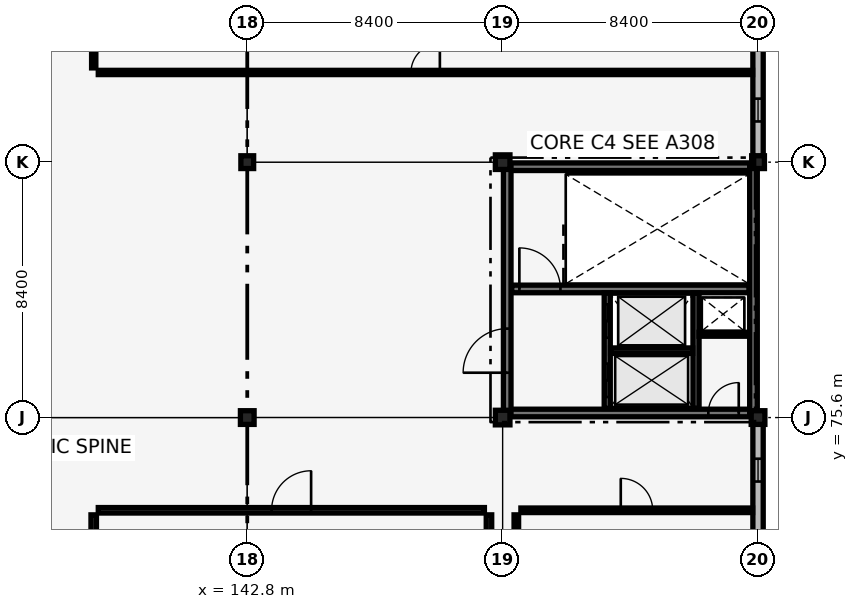
"""IFC4 building model, lengths in metres.
Left out: names, types, materials, properties, quantities, classifications, styles, units other than length and angle.
Written with IfcOpenShell. Run it as: python <this file> out.ifc"""

import sys

from ifc_helpers import new_model, si_unit, direction, frame, frame_2d, origin, origin_2d, place, context, subcontext, project, spatial, rectangle, extrude, element, fill, save


model = new_model("IFC4")
c1 = context("Model", 3, precision=1e-05, world=origin(), true_north=direction((0.0, 1.0)))
c2 = subcontext(c1, "Body", "Model", "MODEL_VIEW")
j1 = project(units=[si_unit("LENGTHUNIT", "METRE"), si_unit("PLANEANGLEUNIT", "RADIAN")], contexts=[c1])
p1 = place(None, origin())
s1 = spatial("IfcSite", under=j1, at=p1, CompositionType="ELEMENT")
p2 = place(p1, origin())
s2 = spatial("IfcBuilding", under=s1, at=p2, CompositionType="ELEMENT")
p3 = place(p2, frame((0.0, 0.0, 26.18)))
s3 = spatial("IfcBuildingStorey", under=s2, at=p3, CompositionType="ELEMENT", Elevation=26.18)
p4 = place(p3, frame((151.35, 75.75, 0.0), z_axis=(0.0, 0.0, 1.0), x_axis=(1.0, 0.0, 0.0)))
e1 = element("IfcWall", 1, at=p4, inside=s3, PredefinedType="SHEAR", context=c2, shape_type="SweptSolid", body=[
    extrude(rectangle(XDim=8.1, YDim=0.25, at=frame_2d((4.05, 0.0))), origin(), (0.0, 0.0, 1.0), 3.84),
])
p5 = place(p4, frame((6.615, 0.0, 0.0)))
e2 = element("IfcOpeningElement", 2, at=p5, cuts=e1, PredefinedType="OPENING", context=c2, shape_type="SweptSolid", body=[
    extrude(rectangle(XDim=1.0, YDim=2.15, at=frame_2d((0.5, 1.075))), frame((0.0, 0.135, 0.0), z_axis=(0.0, -1.0, 0.0), x_axis=(1.0, 0.0, 0.0)), (0.0, 0.0, 1.0), 0.27),
])
p6 = place(p3, frame((151.35, 83.85, 0.0), z_axis=(0.0, 0.0, 1.0), x_axis=(1.0, 0.0, 0.0)))
e3 = element("IfcWall", 3, at=p6, inside=s3, PredefinedType="SHEAR", context=c2, shape_type="SweptSolid", body=[
    extrude(rectangle(XDim=8.1, YDim=0.25, at=frame_2d((4.05, 0.0))), origin(), (0.0, 0.0, 1.0), 3.84),
])
p7 = place(p3, frame((151.35, 75.75, 0.0), z_axis=(0.0, 0.0, 1.0), x_axis=(0.0, 1.0, 0.0)))
e4 = element("IfcWall", 4, at=p7, inside=s3, PredefinedType="SHEAR", context=c2, shape_type="SweptSolid", body=[
    extrude(rectangle(XDim=8.1, YDim=0.25, at=frame_2d((4.05, 0.0))), origin(), (0.0, 0.0, 1.0), 3.84),
])
p8 = place(p7, frame((1.325, 0.0, 0.0)))
e5 = element("IfcOpeningElement", 5, at=p8, cuts=e4, PredefinedType="OPENING", context=c2, shape_type="SweptSolid", body=[
    extrude(rectangle(XDim=1.45, YDim=2.15, at=frame_2d((0.725, 1.075))), frame((0.0, 0.135, 0.0), z_axis=(0.0, -1.0, 0.0), x_axis=(1.0, 0.0, 0.0)), (0.0, 0.0, 1.0), 0.27),
])
p9 = place(p3, frame((159.45, 75.75, 0.0), z_axis=(0.0, 0.0, 1.0), x_axis=(0.0, 1.0, 0.0)))
e6 = element("IfcWall", 6, at=p9, inside=s3, PredefinedType="SHEAR", context=c2, shape_type="SweptSolid", body=[
    extrude(rectangle(XDim=8.1, YDim=0.25, at=frame_2d((4.05, 0.0))), origin(), (0.0, 0.0, 1.0), 3.84),
])
p10 = place(p3, frame((151.5, 79.83, 0.0), z_axis=(0.0, 0.0, 1.0), x_axis=(1.0, 0.0, 0.0)))
e7 = element("IfcWall", 7, at=p10, inside=s3, PredefinedType="SHEAR", context=c2, shape_type="SweptSolid", body=[
    extrude(rectangle(XDim=7.8, YDim=0.25, at=frame_2d((3.9, 0.0))), origin(), (0.0, 0.0, 1.0), 3.84),
])
p11 = place(p10, frame((0.25, 0.0, 0.0)))
e8 = element("IfcOpeningElement", 8, at=p11, cuts=e7, PredefinedType="OPENING", context=c2, shape_type="SweptSolid", body=[
    extrude(rectangle(XDim=1.35, YDim=2.15, at=frame_2d((0.675, 1.075))), frame((0.0, 0.135, 0.0), z_axis=(0.0, -1.0, 0.0), x_axis=(1.0, 0.0, 0.0)), (0.0, 0.0, 1.0), 0.27),
])
p12 = place(p3, frame((142.8, 75.6, 0.0), z_axis=(0.0, 0.0, 1.0), x_axis=(1.0, 0.0, 0.0)))
e9 = element("IfcColumn", 9, at=p12, inside=s3, PredefinedType="COLUMN", context=c2, shape_type="SweptSolid", body=[
    extrude(rectangle(XDim=0.45, YDim=0.45, at=origin_2d()), origin(), (0.0, 0.0, 1.0), 3.84),
])
p13 = place(p3, frame((142.8, 84.0, 0.0), z_axis=(0.0, 0.0, 1.0), x_axis=(1.0, 0.0, 0.0)))
e10 = element("IfcColumn", 10, at=p13, inside=s3, PredefinedType="COLUMN", context=c2, shape_type="SweptSolid", body=[
    extrude(rectangle(XDim=0.42, YDim=0.42, at=origin_2d()), origin(), (0.0, 0.0, 1.0), 3.84),
])
for number, where, z_axis, x_axis in (
    (11, (151.2, 75.6, 0.0), (0.0, 0.0, 1.0), (1.0, 0.0, 0.0)),
    (12, (151.2, 84.0, 0.0), (0.0, 0.0, 1.0), (1.0, 0.0, 0.0)),
):
    element("IfcColumn", number, at=place(p3, frame(where, z_axis=z_axis, x_axis=x_axis)), inside=s3, PredefinedType="COLUMN", context=c2, shape_type="SweptSolid", body=[
        extrude(rectangle(XDim=0.48, YDim=0.48, at=origin_2d()), origin(), (0.0, 0.0, 1.0), 3.84),
    ])
p14 = place(p3, frame((159.6, 75.6, 0.0), z_axis=(0.0, 0.0, 1.0), x_axis=(1.0, 0.0, 0.0)))
e13 = element("IfcColumn", 13, at=p14, inside=s3, PredefinedType="COLUMN", context=c2, shape_type="SweptSolid", body=[
    extrude(rectangle(XDim=0.45, YDim=0.45, at=origin_2d()), origin(), (0.0, 0.0, 1.0), 3.84),
])
p15 = place(p3, frame((159.6, 84.0, 0.0), z_axis=(0.0, 0.0, 1.0), x_axis=(1.0, 0.0, 0.0)))
e14 = element("IfcColumn", 14, at=p15, inside=s3, PredefinedType="COLUMN", context=c2, shape_type="SweptSolid", body=[
    extrude(rectangle(XDim=0.42, YDim=0.42, at=origin_2d()), origin(), (0.0, 0.0, 1.0), 3.84),
])
p16 = place(p3, frame((159.6, 67.395, 0.0), z_axis=(0.0, 0.0, 1.0), x_axis=(0.0, 1.0, 0.0)))
e15 = element("IfcWall", 15, at=p16, inside=s3, PredefinedType="SOLIDWALL", context=c2, shape_type="SweptSolid", body=[
    extrude(rectangle(XDim=7.995, YDim=0.34, at=frame_2d((3.998, 0.0))), origin(), (0.0, 0.0, 1.0), 3.48),
])
p17 = place(p16, frame((1.144, 0.0, 0.75)))
e16 = element("IfcOpeningElement", 16, at=p17, cuts=e15, PredefinedType="OPENING", context=c2, shape_type="SweptSolid", body=[
    extrude(rectangle(XDim=0.75, YDim=2.1, at=frame_2d((0.375, 1.05))), frame((0.0, 0.18, 0.0), z_axis=(0.0, -1.0, 0.0), x_axis=(1.0, 0.0, 0.0)), (0.0, 0.0, 1.0), 0.36),
])
p18 = place(p16, frame((2.743, 0.0, 0.75)))
e17 = element("IfcOpeningElement", 17, at=p18, cuts=e15, PredefinedType="OPENING", context=c2, shape_type="SweptSolid", body=[
    extrude(rectangle(XDim=0.75, YDim=2.1, at=frame_2d((0.375, 1.05))), frame((0.0, 0.18, 0.0), z_axis=(0.0, -1.0, 0.0), x_axis=(1.0, 0.0, 0.0)), (0.0, 0.0, 1.0), 0.36),
])
p19 = place(p16, frame((6.101, 0.0, 0.75)))
e18 = element("IfcOpeningElement", 18, at=p19, cuts=e15, PredefinedType="OPENING", context=c2, shape_type="SweptSolid", body=[
    extrude(rectangle(XDim=0.75, YDim=2.1, at=frame_2d((0.375, 1.05))), frame((0.0, 0.18, 0.0), z_axis=(0.0, -1.0, 0.0), x_axis=(1.0, 0.0, 0.0)), (0.0, 0.0, 1.0), 0.36),
])
p20 = place(p3, frame((159.6, 84.195, 0.0), z_axis=(0.0, 0.0, 1.0), x_axis=(0.0, 1.0, 0.0)))
e19 = element("IfcWall", 19, at=p20, inside=s3, PredefinedType="SOLIDWALL", context=c2, shape_type="SweptSolid", body=[
    extrude(rectangle(XDim=7.995, YDim=0.34, at=frame_2d((3.998, 0.0))), origin(), (0.0, 0.0, 1.0), 3.48),
])
p21 = place(p20, frame((1.144, 0.0, 0.75)))
e20 = element("IfcOpeningElement", 20, at=p21, cuts=e19, PredefinedType="OPENING", context=c2, shape_type="SweptSolid", body=[
    extrude(rectangle(XDim=0.75, YDim=2.1, at=frame_2d((0.375, 1.05))), frame((0.0, 0.18, 0.0), z_axis=(0.0, -1.0, 0.0), x_axis=(1.0, 0.0, 0.0)), (0.0, 0.0, 1.0), 0.36),
])
p22 = place(p20, frame((4.502, 0.0, 0.75)))
e21 = element("IfcOpeningElement", 21, at=p22, cuts=e19, PredefinedType="OPENING", context=c2, shape_type="SweptSolid", body=[
    extrude(rectangle(XDim=0.75, YDim=2.1, at=frame_2d((0.375, 1.05))), frame((0.0, 0.18, 0.0), z_axis=(0.0, -1.0, 0.0), x_axis=(1.0, 0.0, 0.0)), (0.0, 0.0, 1.0), 0.36),
])
p23 = place(p20, frame((6.101, 0.0, 0.75)))
e22 = element("IfcOpeningElement", 22, at=p23, cuts=e19, PredefinedType="OPENING", context=c2, shape_type="SweptSolid", body=[
    extrude(rectangle(XDim=0.75, YDim=2.1, at=frame_2d((0.375, 1.05))), frame((0.0, 0.18, 0.0), z_axis=(0.0, -1.0, 0.0), x_axis=(1.0, 0.0, 0.0)), (0.0, 0.0, 1.0), 0.36),
])
p24 = place(p3, frame((154.64, 75.9, 0.0), z_axis=(0.0, 0.0, 1.0), x_axis=(0.0, 1.0, 0.0)))
e23 = element("IfcWall", 23, at=p24, inside=s3, PredefinedType="SHEAR", context=c2, shape_type="SweptSolid", body=[
    extrude(rectangle(XDim=3.8, YDim=0.2, at=frame_2d((1.9, 0.0))), origin(), (0.0, 0.0, 1.0), 3.84),
])
p25 = place(p24, frame((0.375, 0.0, 0.0)))
e24 = element("IfcOpeningElement", 24, at=p25, cuts=e23, PredefinedType="OPENING", context=c2, shape_type="SweptSolid", body=[
    extrude(rectangle(XDim=1.1, YDim=2.15, at=frame_2d((0.55, 1.075))), frame((0.0, 0.11, 0.0), z_axis=(0.0, -1.0, 0.0), x_axis=(1.0, 0.0, 0.0)), (0.0, 0.0, 1.0), 0.22),
])
p26 = place(p24, frame((2.325, 0.0, 0.0)))
e25 = element("IfcOpeningElement", 25, at=p26, cuts=e23, PredefinedType="OPENING", context=c2, shape_type="SweptSolid", body=[
    extrude(rectangle(XDim=1.1, YDim=2.15, at=frame_2d((0.55, 1.075))), frame((0.0, 0.11, 0.0), z_axis=(0.0, -1.0, 0.0), x_axis=(1.0, 0.0, 0.0)), (0.0, 0.0, 1.0), 0.22),
])
p27 = place(p3, frame((157.56, 75.9, 0.0), z_axis=(0.0, 0.0, 1.0), x_axis=(0.0, 1.0, 0.0)))
e26 = element("IfcWall", 26, at=p27, inside=s3, PredefinedType="SHEAR", context=c2, shape_type="SweptSolid", body=[
    extrude(rectangle(XDim=3.8, YDim=0.2, at=frame_2d((1.9, 0.0))), origin(), (0.0, 0.0, 1.0), 3.84),
])
p28 = place(p3, frame((154.75, 77.8, 0.0), z_axis=(0.0, 0.0, 1.0), x_axis=(1.0, 0.0, 0.0)))
e27 = element("IfcWall", 27, at=p28, inside=s3, PredefinedType="SHEAR", context=c2, shape_type="SweptSolid", body=[
    extrude(rectangle(XDim=2.7, YDim=0.18, at=frame_2d((1.35, 0.0))), origin(), (0.0, 0.0, 1.0), 3.84),
])
p29 = place(p3, frame((157.66, 78.34, 0.0), z_axis=(0.0, 0.0, 1.0), x_axis=(1.0, 0.0, 0.0)))
e28 = element("IfcWall", 28, at=p29, inside=s3, PredefinedType="PARTITIONING", context=c2, shape_type="SweptSolid", body=[
    extrude(rectangle(XDim=1.62, YDim=0.13, at=frame_2d((0.81, 0.0))), origin(), (0.0, 0.0, 1.0), 3.84),
])
p30 = place(p3, frame((137.9, 72.55, 0.0), z_axis=(0.0, 0.0, 1.0), x_axis=(1.0, 0.0, 0.0)))
e29 = element("IfcWall", 29, at=p30, inside=s3, PredefinedType="PARTITIONING", context=c2, shape_type="SweptSolid", body=[
    extrude(rectangle(XDim=12.7, YDim=0.18, at=frame_2d((6.35, 0.0))), origin(), (0.0, 0.0, 1.0), 3.48),
])
p31 = place(p30, frame((5.7, 0.0, 0.0)))
e30 = element("IfcOpeningElement", 30, at=p31, cuts=e29, PredefinedType="OPENING", context=c2, shape_type="SweptSolid", body=[
    extrude(rectangle(XDim=1.3, YDim=2.2, at=frame_2d((0.65, 1.1))), frame((0.0, 0.1, 0.0), z_axis=(0.0, -1.0, 0.0), x_axis=(1.0, 0.0, 0.0)), (0.0, 0.0, 1.0), 0.2),
])
for number, where, z_axis, x_axis in (
    (31, (137.75, 34.2, 0.0), (0.0, 0.0, 1.0), (0.0, 1.0, 0.0)),
    (32, (150.75, 34.2, 0.0), (0.0, 0.0, 1.0), (0.0, 1.0, 0.0)),
):
    element("IfcWall", number, at=place(p3, frame(where, z_axis=z_axis, x_axis=x_axis)), inside=s3, PredefinedType="PARTITIONING", context=c2, shape_type="SweptSolid", body=[
        extrude(rectangle(XDim=38.2, YDim=0.18, at=frame_2d((19.1, 0.0))), origin(), (0.0, 0.0, 1.0), 3.84),
    ])
p32 = place(p3, frame((151.8, 72.55, 0.0), z_axis=(0.0, 0.0, 1.0), x_axis=(1.0, 0.0, 0.0)))
e33 = element("IfcWall", 33, at=p32, inside=s3, PredefinedType="PARTITIONING", context=c2, shape_type="SweptSolid", body=[
    extrude(rectangle(XDim=7.62, YDim=0.15, at=frame_2d((3.81, 0.0))), origin(), (0.0, 0.0, 1.0), 3.48),
])
p33 = place(p32, frame((3.285, 0.0, 0.0)))
e34 = element("IfcOpeningElement", 34, at=p33, cuts=e33, PredefinedType="OPENING", context=c2, shape_type="SweptSolid", body=[
    extrude(rectangle(XDim=1.05, YDim=2.15, at=frame_2d((0.525, 1.075))), frame((0.0, 0.085, 0.0), z_axis=(0.0, -1.0, 0.0), x_axis=(1.0, 0.0, 0.0)), (0.0, 0.0, 1.0), 0.17),
])
p34 = place(p3, frame((151.65, 42.03, 0.0), z_axis=(0.0, 0.0, 1.0), x_axis=(0.0, 1.0, 0.0)))
e35 = element("IfcWall", 35, at=p34, inside=s3, PredefinedType="PARTITIONING", context=c2, shape_type="SweptSolid", body=[
    extrude(rectangle(XDim=30.37, YDim=0.15, at=frame_2d((15.185, 0.0))), origin(), (0.0, 0.0, 1.0), 3.84),
])
p35 = place(p3, frame((137.9, 86.95, 0.0), z_axis=(0.0, 0.0, 1.0), x_axis=(1.0, 0.0, 0.0)))
e36 = element("IfcWall", 36, at=p35, inside=s3, PredefinedType="PARTITIONING", context=c2, shape_type="SweptSolid", body=[
    extrude(rectangle(XDim=21.52, YDim=0.14, at=frame_2d((10.76, 0.0))), origin(), (0.0, 0.0, 1.0), 3.48),
])
p36 = place(p35, frame((10.285, 0.0, 0.0)))
e37 = element("IfcOpeningElement", 37, at=p36, cuts=e36, PredefinedType="OPENING", context=c2, shape_type="SweptSolid", body=[
    extrude(rectangle(XDim=0.95, YDim=2.1, at=frame_2d((0.475, 1.05))), frame((0.0, 0.08, 0.0), z_axis=(0.0, -1.0, 0.0), x_axis=(1.0, 0.0, 0.0)), (0.0, 0.0, 1.0), 0.16),
])
p37 = place(p3, frame((137.75, 87.1, 0.0), z_axis=(0.0, 0.0, 1.0), x_axis=(0.0, 1.0, 0.0)))
e38 = element("IfcWall", 38, at=p37, inside=s3, PredefinedType="PARTITIONING", context=c2, shape_type="SweptSolid", body=[
    extrude(rectangle(XDim=13.52, YDim=0.14, at=frame_2d((6.76, 0.0))), origin(), (0.0, 0.0, 1.0), 3.84),
])
p38 = place(p19, origin())
e39 = element("IfcWindow", 39, at=p38, inside=s3, PartitioningType="DOUBLE_PANEL_VERTICAL", PredefinedType="WINDOW", context=c2, shape_type="SweptSolid", body=[
    extrude(rectangle(XDim=0.75, YDim=2.1, at=frame_2d((0.375, 1.05))), frame((0.0, 0.03, 0.0), z_axis=(0.0, -1.0, 0.0), x_axis=(1.0, 0.0, 0.0)), (0.0, 0.0, 1.0), 0.06),
])
fill(e18, e39)
p39 = place(p21, origin())
e40 = element("IfcWindow", 40, at=p39, inside=s3, PartitioningType="DOUBLE_PANEL_VERTICAL", PredefinedType="WINDOW", context=c2, shape_type="SweptSolid", body=[
    extrude(rectangle(XDim=0.75, YDim=2.1, at=frame_2d((0.375, 1.05))), frame((0.0, 0.03, 0.0), z_axis=(0.0, -1.0, 0.0), x_axis=(1.0, 0.0, 0.0)), (0.0, 0.0, 1.0), 0.06),
])
fill(e20, e40)
p40 = place(p11, origin())
e41 = element("IfcDoor", 41, at=p40, inside=s3, OperationType="SINGLE_SWING_LEFT", PredefinedType="DOOR", context=c2, shape_type="SweptSolid", body=[
    extrude(rectangle(XDim=1.35, YDim=2.15, at=frame_2d((0.675, 1.075))), frame((0.0, 0.025, 0.0), z_axis=(0.0, -1.0, 0.0), x_axis=(1.0, 0.0, 0.0)), (0.0, 0.0, 1.0), 0.05),
])
fill(e8, e41)
p41 = place(p25, origin())
e42 = element("IfcDoor", 42, at=p41, inside=s3, OperationType="SLIDING_TO_LEFT", PredefinedType="DOOR", context=c2, shape_type="SweptSolid", body=[
    extrude(rectangle(XDim=1.1, YDim=2.15, at=frame_2d((0.55, 1.075))), frame((0.0, 0.025, 0.0), z_axis=(0.0, -1.0, 0.0), x_axis=(1.0, 0.0, 0.0)), (0.0, 0.0, 1.0), 0.05),
])
fill(e24, e42)
p42 = place(p26, origin())
e43 = element("IfcDoor", 43, at=p42, inside=s3, OperationType="SLIDING_TO_LEFT", PredefinedType="DOOR", context=c2, shape_type="SweptSolid", body=[
    extrude(rectangle(XDim=1.1, YDim=2.15, at=frame_2d((0.55, 1.075))), frame((0.0, 0.025, 0.0), z_axis=(0.0, -1.0, 0.0), x_axis=(1.0, 0.0, 0.0)), (0.0, 0.0, 1.0), 0.05),
])
fill(e25, e43)
p43 = place(p8, origin())
e44 = element("IfcDoor", 44, at=p43, inside=s3, OperationType="DOUBLE_DOOR_SINGLE_SWING", PredefinedType="DOOR", context=c2, shape_type="SweptSolid", body=[
    extrude(rectangle(XDim=1.45, YDim=2.15, at=frame_2d((0.725, 1.075))), frame((0.0, 0.025, 0.0), z_axis=(0.0, -1.0, 0.0), x_axis=(1.0, 0.0, 0.0)), (0.0, 0.0, 1.0), 0.05),
])
fill(e5, e44)
p44 = place(p5, origin())
e45 = element("IfcDoor", 45, at=p44, inside=s3, OperationType="SINGLE_SWING_RIGHT", PredefinedType="DOOR", context=c2, shape_type="SweptSolid", body=[
    extrude(rectangle(XDim=1.0, YDim=2.15, at=frame_2d((0.5, 1.075))), frame((0.0, 0.025, 0.0), z_axis=(0.0, -1.0, 0.0), x_axis=(1.0, 0.0, 0.0)), (0.0, 0.0, 1.0), 0.05),
])
fill(e2, e45)
p45 = place(p31, origin())
e46 = element("IfcDoor", 46, at=p45, inside=s3, OperationType="SINGLE_SWING_RIGHT", PredefinedType="DOOR", context=c2, shape_type="SweptSolid", body=[
    extrude(rectangle(XDim=1.3, YDim=2.2, at=frame_2d((0.65, 1.1))), frame((0.0, 0.025, 0.0), z_axis=(0.0, -1.0, 0.0), x_axis=(1.0, 0.0, 0.0)), (0.0, 0.0, 1.0), 0.05),
])
fill(e30, e46)
p46 = place(p33, origin())
e47 = element("IfcDoor", 47, at=p46, inside=s3, OperationType="SINGLE_SWING_LEFT", PredefinedType="DOOR", context=c2, shape_type="SweptSolid", body=[
    extrude(rectangle(XDim=1.05, YDim=2.15, at=frame_2d((0.525, 1.075))), frame((0.0, 0.025, 0.0), z_axis=(0.0, -1.0, 0.0), x_axis=(1.0, 0.0, 0.0)), (0.0, 0.0, 1.0), 0.05),
])
fill(e34, e47)
p47 = place(p36, origin())
e48 = element("IfcDoor", 48, at=p47, inside=s3, OperationType="SINGLE_SWING_RIGHT", PredefinedType="DOOR", context=c2, shape_type="SweptSolid", body=[
    extrude(rectangle(XDim=0.95, YDim=2.1, at=frame_2d((0.475, 1.05))), frame((0.0, 0.025, 0.0), z_axis=(0.0, -1.0, 0.0), x_axis=(1.0, 0.0, 0.0)), (0.0, 0.0, 1.0), 0.05),
])
fill(e37, e48)
save(model, sys.argv[1])
